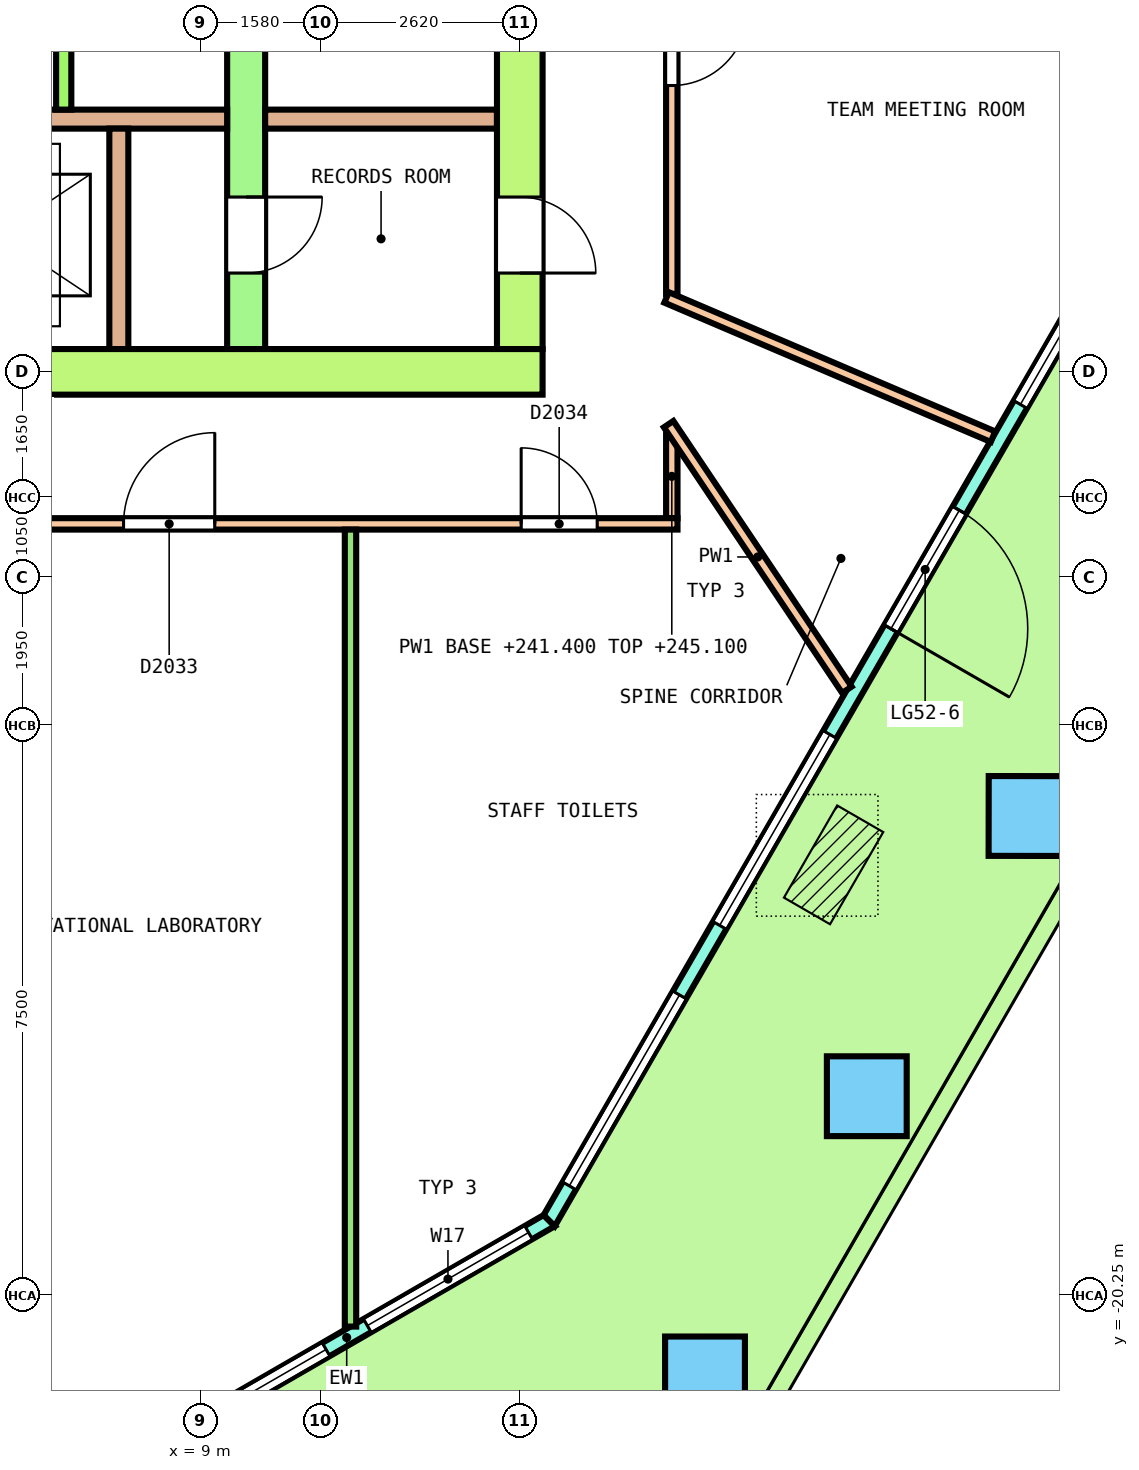
"""IFC4 building model, lengths in metres.
Left out: names, types, materials, properties, quantities, classifications, styles, units other than length and angle.
Written with IfcOpenShell. Run it as: python <this file> out.ifc"""

import sys

from ifc_helpers import new_model, si_unit, direction, frame, frame_2d, origin, origin_2d, place, context, subcontext, project, spatial, polyline, rectangle, outline, extrude, element, fill, save


model = new_model("IFC4")
c1 = context("Model", 3, precision=1e-05, world=origin(), true_north=direction((0.0, 1.0)))
c2 = subcontext(c1, "Body", "Model", "MODEL_VIEW")
j1 = project(units=[si_unit("LENGTHUNIT", "METRE"), si_unit("PLANEANGLEUNIT", "RADIAN")], contexts=[c1])
p1 = place(None, origin())
s1 = spatial("IfcSite", under=j1, at=p1, CompositionType="ELEMENT")
p2 = place(p1, origin())
s2 = spatial("IfcBuilding", under=s1, at=p2, CompositionType="ELEMENT")
p3 = place(p2, frame((0.0, 0.0, 241.4)))
s3 = spatial("IfcBuildingStorey", under=s2, at=p3, CompositionType="ELEMENT", Elevation=241.4)
p4 = place(p3, frame((15.637, -21.316, 0.0), z_axis=(-0.018113955825, -0.03141534774, 0.999342263957), x_axis=(0.499040514287, 0.865819568771, 0.036263472456)))
e1 = element("IfcColumn", 1, at=p4, inside=s3, PredefinedType="COLUMN", context=c2, shape_type="SweptSolid", body=[
    extrude(rectangle(XDim=1.05, YDim=1.05, at=origin_2d()), origin(), (0.0, 0.0, 1.0), 3.653),
])
p5 = place(p3, frame((17.765, -17.63, 0.0), z_axis=(-0.010899694483, -0.018857140148, 0.999762774325), x_axis=(0.500226191374, 0.865620795957, 0.021780612244)))
e2 = element("IfcColumn", 2, at=p5, inside=s3, PredefinedType="COLUMN", context=c2, shape_type="SweptSolid", body=[
    extrude(rectangle(XDim=1.05, YDim=1.05, at=origin_2d()), origin(), (0.0, 0.0, 1.0), 3.651),
])
p6 = place(p3, frame((19.894, -13.943, 0.0), z_axis=(-0.003611702075, -0.006353920318, 0.999973291296), x_axis=(0.495427453778, 0.868618570756, 0.007308664753)))
e3 = element("IfcColumn", 3, at=p6, inside=s3, PredefinedType="COLUMN", context=c2, shape_type="SweptSolid", body=[
    extrude(rectangle(XDim=1.05, YDim=1.05, at=origin_2d()), origin(), (0.0, 0.0, 1.0), 3.65),
])
p7 = place(p3, frame((8.259, -22.343, 0.0), z_axis=(0.0, 0.0, 1.0), x_axis=(0.866029647142, 0.499992650217, 0.0)))
e4 = element("IfcWall", 4, at=p7, inside=s3, PredefinedType="SOLIDWALL", context=c2, shape_type="SweptSolid", body=[
    extrude(outline(polyline([(-0.027, -0.1), (1.008, -0.1), (2.042, -0.1), (3.076, -0.1), (4.111, -0.1), (5.145, -0.1), (6.18, -0.1), (6.126, 0.1), (5.109, 0.1), (4.093, 0.1), (3.076, 0.1), (2.06, 0.1), (1.043, 0.1), (0.027, 0.1), (-0.027, -0.1)])), origin(), (0.0, 0.0, 1.0), 3.7),
])
p8 = place(p7, frame((0.313, 0.0, 0.1)))
e5 = element("IfcOpeningElement", 5, at=p8, cuts=e4, PredefinedType="OPENING", context=c2, shape_type="SweptSolid", body=[
    extrude(rectangle(XDim=2.45, YDim=2.65, at=frame_2d((1.225, 1.325))), frame((0.0, 0.11, 0.0), z_axis=(0.0, -1.0, 0.0), x_axis=(1.0, 0.0, 0.0)), (0.0, 0.0, 1.0), 0.22),
])
p9 = place(p7, frame((3.39, 0.0, 0.1)))
e6 = element("IfcOpeningElement", 6, at=p9, cuts=e4, PredefinedType="OPENING", context=c2, shape_type="SweptSolid", body=[
    extrude(rectangle(XDim=2.45, YDim=2.65, at=frame_2d((1.225, 1.325))), frame((0.0, 0.11, 0.0), z_axis=(0.0, -1.0, 0.0), x_axis=(1.0, 0.0, 0.0)), (0.0, 0.0, 1.0), 0.22),
])
p10 = place(p3, frame((13.587, -19.266, 0.0), z_axis=(0.0, 0.0, 1.0), x_axis=(0.500004117472, 0.866023026548, 0.0)))
e7 = element("IfcWall", 7, at=p10, inside=s3, PredefinedType="SOLIDWALL", context=c2, shape_type="SweptSolid", body=[
    extrude(outline(polyline([(-0.027, -0.1), (1.017, -0.1), (2.061, -0.1), (3.105, -0.1), (4.149, -0.1), (5.193, -0.1), (6.237, -0.1), (7.281, -0.1), (8.325, -0.1), (9.369, -0.1), (10.414, -0.1), (11.458, -0.1), (12.501, -0.1), (13.546, -0.1), (14.59, -0.1), (15.634, -0.1), (16.678, -0.1), (17.722, -0.1), (18.766, -0.1), (19.81, -0.1), (19.756, 0.1), (18.718, 0.1), (17.679, 0.1), (16.641, 0.1), (15.603, 0.1), (14.564, 0.1), (13.526, 0.1), (12.488, 0.1), (11.449, 0.1), (10.411, 0.1), (9.372, 0.1), (8.334, 0.1), (7.295, 0.1), (6.257, 0.1), (5.219, 0.1), (4.18, 0.1), (3.142, 0.1), (2.104, 0.1), (1.065, 0.1), (0.027, 0.1), (-0.027, -0.1)])), origin(), (0.0, 0.0, 1.0), 3.7),
])
p11 = place(p10, frame((0.528, 0.0, 0.1)))
e8 = element("IfcOpeningElement", 8, at=p11, cuts=e7, PredefinedType="OPENING", context=c2, shape_type="SweptSolid", body=[
    extrude(rectangle(XDim=2.9, YDim=2.65, at=frame_2d((1.45, 1.325))), frame((0.0, 0.11, 0.0), z_axis=(0.0, -1.0, 0.0), x_axis=(1.0, 0.0, 0.0)), (0.0, 0.0, 1.0), 0.22),
])
p12 = place(p10, frame((4.485, 0.0, 0.1)))
e9 = element("IfcOpeningElement", 9, at=p12, cuts=e7, PredefinedType="OPENING", context=c2, shape_type="SweptSolid", body=[
    extrude(rectangle(XDim=2.9, YDim=2.65, at=frame_2d((1.45, 1.325))), frame((0.0, 0.11, 0.0), z_axis=(0.0, -1.0, 0.0), x_axis=(1.0, 0.0, 0.0)), (0.0, 0.0, 1.0), 0.22),
])
p13 = place(p10, frame((8.991, 0.0, 0.0)))
e10 = element("IfcOpeningElement", 10, at=p13, cuts=e7, PredefinedType="OPENING", context=c2, shape_type="SweptSolid", body=[
    extrude(rectangle(XDim=1.8, YDim=2.4, at=frame_2d((0.9, 1.2))), frame((0.0, 0.11, 0.0), z_axis=(0.0, -1.0, 0.0), x_axis=(1.0, 0.0, 0.0)), (0.0, 0.0, 1.0), 0.22),
])
p14 = place(p10, frame((8.991, 0.0, 2.55)))
e11 = element("IfcOpeningElement", 11, at=p14, cuts=e7, PredefinedType="OPENING", context=c2, shape_type="SweptSolid", body=[
    extrude(rectangle(XDim=1.8, YDim=0.2, at=frame_2d((0.9, 0.1))), frame((0.0, 0.11, 0.0), z_axis=(0.0, -1.0, 0.0), x_axis=(1.0, 0.0, 0.0)), (0.0, 0.0, 1.0), 0.22),
])
p15 = place(p10, frame((12.398, 0.0, 0.1)))
e12 = element("IfcOpeningElement", 12, at=p15, cuts=e7, PredefinedType="OPENING", context=c2, shape_type="SweptSolid", body=[
    extrude(rectangle(XDim=2.9, YDim=2.65, at=frame_2d((1.45, 1.325))), frame((0.0, 0.11, 0.0), z_axis=(0.0, -1.0, 0.0), x_axis=(1.0, 0.0, 0.0)), (0.0, 0.0, 1.0), 0.22),
])
p16 = place(p10, frame((16.355, 0.0, 0.1)))
e13 = element("IfcOpeningElement", 13, at=p16, cuts=e7, PredefinedType="OPENING", context=c2, shape_type="SweptSolid", body=[
    extrude(rectangle(XDim=2.9, YDim=2.65, at=frame_2d((1.45, 1.325))), frame((0.0, 0.11, 0.0), z_axis=(0.0, -1.0, 0.0), x_axis=(1.0, 0.0, 0.0)), (0.0, 0.0, 1.0), 0.22),
])
p17 = place(p3, frame((-13.5, -8.1, 0.0), z_axis=(0.0, 0.0, 1.0), x_axis=(1.0, 0.0, 0.0)))
e14 = element("IfcWall", 14, at=p17, inside=s3, PredefinedType="SHEAR", context=c2, shape_type="SweptSolid", body=[
    extrude(rectangle(XDim=27.0, YDim=0.6, at=frame_2d((13.5, 0.0))), origin(), (0.0, 0.0, 1.0), 3.7),
])
p18 = place(p17, frame((15.05, 0.0, 0.0)))
e15 = element("IfcOpeningElement", 15, at=p18, cuts=e14, PredefinedType="OPENING", context=c2, shape_type="SweptSolid", body=[
    extrude(rectangle(XDim=1.2, YDim=2.1, at=frame_2d((0.6, 1.05))), frame((0.0, 0.31, 0.0), z_axis=(0.0, -1.0, 0.0), x_axis=(1.0, 0.0, 0.0)), (0.0, 0.0, 1.0), 0.62),
])
p19 = place(p3, frame((13.2, -7.8, 0.0), z_axis=(0.0, 0.0, 1.0), x_axis=(0.0, 1.0, 0.0)))
e16 = element("IfcWall", 16, at=p19, inside=s3, PredefinedType="SHEAR", context=c2, shape_type="SweptSolid", body=[
    extrude(rectangle(XDim=15.6, YDim=0.6, at=frame_2d((7.8, 0.0))), origin(), (0.0, 0.0, 1.0), 3.7),
])
p20 = place(p19, frame((6.6, 0.0, 0.0)))
e17 = element("IfcOpeningElement", 17, at=p20, cuts=e16, PredefinedType="OPENING", context=c2, shape_type="SweptSolid", body=[
    extrude(rectangle(XDim=2.4, YDim=2.1, at=frame_2d((1.2, 1.05))), frame((0.0, 0.31, 0.0), z_axis=(0.0, -1.0, 0.0), x_axis=(1.0, 0.0, 0.0)), (0.0, 0.0, 1.0), 0.62),
])
p21 = place(p19, frame((13.5, 0.0, 0.0)))
e18 = element("IfcOpeningElement", 18, at=p21, cuts=e16, PredefinedType="OPENING", context=c2, shape_type="SweptSolid", body=[
    extrude(rectangle(XDim=1.2, YDim=2.1, at=frame_2d((0.6, 1.05))), frame((0.0, 0.31, 0.0), z_axis=(0.0, -1.0, 0.0), x_axis=(1.0, 0.0, 0.0)), (0.0, 0.0, 1.0), 0.62),
])
p22 = place(p19, frame((1.0, 0.0, 0.0)))
e19 = element("IfcOpeningElement", 19, at=p22, cuts=e16, PredefinedType="OPENING", context=c2, shape_type="SweptSolid", body=[
    extrude(rectangle(XDim=1.0, YDim=2.1, at=frame_2d((0.5, 1.05))), frame((0.0, 0.31, 0.0), z_axis=(0.0, -1.0, 0.0), x_axis=(1.0, 0.0, 0.0)), (0.0, 0.0, 1.0), 0.62),
])
p23 = place(p3, frame((9.6, -7.8, 0.0), z_axis=(0.0, 0.0, 1.0), x_axis=(0.0, 1.0, 0.0)))
e20 = element("IfcWall", 20, at=p23, inside=s3, PredefinedType="SHEAR", context=c2, shape_type="SweptSolid", body=[
    extrude(rectangle(XDim=15.6, YDim=0.5, at=frame_2d((7.8, 0.0))), origin(), (0.0, 0.0, 1.0), 3.7),
])
p24 = place(p23, frame((6.6, 0.0, 0.0)))
e21 = element("IfcOpeningElement", 21, at=p24, cuts=e20, PredefinedType="OPENING", context=c2, shape_type="SweptSolid", body=[
    extrude(rectangle(XDim=2.4, YDim=2.1, at=frame_2d((1.2, 1.05))), frame((0.0, 0.26, 0.0), z_axis=(0.0, -1.0, 0.0), x_axis=(1.0, 0.0, 0.0)), (0.0, 0.0, 1.0), 0.52),
])
p25 = place(p23, frame((13.5, 0.0, 0.0)))
e22 = element("IfcOpeningElement", 22, at=p25, cuts=e20, PredefinedType="OPENING", context=c2, shape_type="SweptSolid", body=[
    extrude(rectangle(XDim=1.2, YDim=2.1, at=frame_2d((0.6, 1.05))), frame((0.0, 0.26, 0.0), z_axis=(0.0, -1.0, 0.0), x_axis=(1.0, 0.0, 0.0)), (0.0, 0.0, 1.0), 0.52),
])
p26 = place(p23, frame((1.0, 0.0, 0.0)))
e23 = element("IfcOpeningElement", 23, at=p26, cuts=e20, PredefinedType="OPENING", context=c2, shape_type="SweptSolid", body=[
    extrude(rectangle(XDim=1.0, YDim=2.1, at=frame_2d((0.5, 1.05))), frame((0.0, 0.26, 0.0), z_axis=(0.0, -1.0, 0.0), x_axis=(1.0, 0.0, 0.0)), (0.0, 0.0, 1.0), 0.52),
])
p27 = place(p3, frame((-9.35, -4.775, 0.0), z_axis=(0.0, 0.0, 1.0), x_axis=(1.0, 0.0, 0.0)))
e24 = element("IfcWall", 24, at=p27, inside=s3, PredefinedType="SOLIDWALL", context=c2, shape_type="SweptSolid", body=[
    extrude(rectangle(XDim=18.7, YDim=0.25, at=frame_2d((9.35, 0.0))), origin(), (0.0, 0.0, 1.0), 3.7),
])
p28 = place(p3, frame((9.85, -4.775, 0.0), z_axis=(0.0, 0.0, 1.0), x_axis=(1.0, 0.0, 0.0)))
e25 = element("IfcWall", 25, at=p28, inside=s3, PredefinedType="SOLIDWALL", context=c2, shape_type="SweptSolid", body=[
    extrude(rectangle(XDim=3.05, YDim=0.25, at=frame_2d((1.525, 0.0))), origin(), (0.0, 0.0, 1.0), 3.7),
])
p29 = place(p3, frame((7.2, -4.65, 0.0), z_axis=(0.0, 0.0, 1.0), x_axis=(0.0, 1.0, 0.0)))
e26 = element("IfcWall", 26, at=p29, inside=s3, PredefinedType="SOLIDWALL", context=c2, shape_type="SweptSolid", body=[
    extrude(rectangle(XDim=2.9, YDim=0.2, at=frame_2d((1.45, 0.0))), origin(), (0.0, 0.0, 1.0), 3.7),
])
p30 = place(p3, frame((7.925, -7.8, 0.0), z_axis=(0.0, 0.0, 1.0), x_axis=(0.0, 1.0, 0.0)))
e27 = element("IfcWall", 27, at=p30, inside=s3, PredefinedType="SOLIDWALL", context=c2, shape_type="SweptSolid", body=[
    extrude(rectangle(XDim=2.9, YDim=0.25, at=frame_2d((1.45, 0.0))), origin(), (0.0, 0.0, 1.0), 3.7),
])
p31 = place(p3, frame((15.2, -10.025, 0.0), z_axis=(0.0, 0.0, 1.0), x_axis=(0.0, 1.0, 0.0)))
e28 = element("IfcWall", 28, at=p31, inside=s3, PredefinedType="PARTITIONING", context=c2, shape_type="SweptSolid", body=[
    extrude(rectangle(XDim=1.1, YDim=0.15, at=frame_2d((0.55, 0.0))), origin(), (0.0, 0.0, 1.0), 3.7),
])
p32 = place(p3, frame((15.2, -7.075, 0.0), z_axis=(0.0, 0.0, 1.0), x_axis=(0.0, 1.0, 0.0)))
e29 = element("IfcWall", 29, at=p32, inside=s3, PredefinedType="PARTITIONING", context=c2, shape_type="SweptSolid", body=[
    extrude(rectangle(XDim=17.1, YDim=0.15, at=frame_2d((8.55, 0.0))), origin(), (0.0, 0.0, 1.0), 2.8),
])
p33 = place(p32, frame((7.418, 0.0, 0.0)))
e30 = element("IfcOpeningElement", 30, at=p33, cuts=e29, PredefinedType="OPENING", context=c2, shape_type="SweptSolid", body=[
    extrude(rectangle(XDim=1.2, YDim=2.1, at=frame_2d((0.6, 1.05))), frame((0.0, 0.085, 0.0), z_axis=(0.0, -1.0, 0.0), x_axis=(1.0, 0.0, 0.0)), (0.0, 0.0, 1.0), 0.17),
])
p34 = place(p32, frame((12.815, 0.0, 0.0)))
e31 = element("IfcOpeningElement", 31, at=p34, cuts=e29, PredefinedType="OPENING", context=c2, shape_type="SweptSolid", body=[
    extrude(rectangle(XDim=1.2, YDim=2.1, at=frame_2d((0.6, 1.05))), frame((0.0, 0.085, 0.0), z_axis=(0.0, -1.0, 0.0), x_axis=(1.0, 0.0, 0.0)), (0.0, 0.0, 1.0), 0.17),
])
p35 = place(p32, frame((2.742, 0.0, 0.0)))
e32 = element("IfcOpeningElement", 32, at=p35, cuts=e29, PredefinedType="OPENING", context=c2, shape_type="SweptSolid", body=[
    extrude(rectangle(XDim=1.0, YDim=2.1, at=frame_2d((0.5, 1.05))), frame((0.0, 0.085, 0.0), z_axis=(0.0, -1.0, 0.0), x_axis=(1.0, 0.0, 0.0)), (0.0, 0.0, 1.0), 0.17),
])
p36 = place(p3, frame((-15.275, -10.1, 0.0), z_axis=(0.0, 0.0, 1.0), x_axis=(1.0, 0.0, 0.0)))
e33 = element("IfcWall", 33, at=p36, inside=s3, PredefinedType="PARTITIONING", context=c2, shape_type="SweptSolid", body=[
    extrude(rectangle(XDim=30.55, YDim=0.15, at=frame_2d((15.275, 0.0))), origin(), (0.0, 0.0, 1.0), 2.8),
])
p37 = place(p36, frame((3.181, 0.0, 0.0)))
e34 = element("IfcOpeningElement", 34, at=p37, cuts=e33, PredefinedType="OPENING", context=c2, shape_type="SweptSolid", body=[
    extrude(rectangle(XDim=1.2, YDim=2.1, at=frame_2d((0.6, 1.05))), frame((0.0, 0.085, 0.0), z_axis=(0.0, -1.0, 0.0), x_axis=(1.0, 0.0, 0.0)), (0.0, 0.0, 1.0), 0.17),
])
p38 = place(p36, frame((8.522, 0.0, 0.0)))
e35 = element("IfcOpeningElement", 35, at=p38, cuts=e33, PredefinedType="OPENING", context=c2, shape_type="SweptSolid", body=[
    extrude(rectangle(XDim=1.2, YDim=2.1, at=frame_2d((0.6, 1.05))), frame((0.0, 0.085, 0.0), z_axis=(0.0, -1.0, 0.0), x_axis=(1.0, 0.0, 0.0)), (0.0, 0.0, 1.0), 0.17),
])
p39 = place(p36, frame((15.2, 0.0, 0.0)))
e36 = element("IfcOpeningElement", 36, at=p39, cuts=e33, PredefinedType="OPENING", context=c2, shape_type="SweptSolid", body=[
    extrude(rectangle(XDim=1.0, YDim=2.1, at=frame_2d((0.5, 1.05))), frame((0.0, 0.085, 0.0), z_axis=(0.0, -1.0, 0.0), x_axis=(1.0, 0.0, 0.0)), (0.0, 0.0, 1.0), 0.17),
])
p40 = place(p36, frame((23.262, 0.0, 0.0)))
e37 = element("IfcOpeningElement", 37, at=p40, cuts=e33, PredefinedType="OPENING", context=c2, shape_type="SweptSolid", body=[
    extrude(rectangle(XDim=1.2, YDim=2.1, at=frame_2d((0.6, 1.05))), frame((0.0, 0.085, 0.0), z_axis=(0.0, -1.0, 0.0), x_axis=(1.0, 0.0, 0.0)), (0.0, 0.0, 1.0), 0.17),
])
p41 = place(p36, frame((28.493, 0.0, 0.0)))
e38 = element("IfcOpeningElement", 38, at=p41, cuts=e33, PredefinedType="OPENING", context=c2, shape_type="SweptSolid", body=[
    extrude(rectangle(XDim=1.0, YDim=2.1, at=frame_2d((0.5, 1.05))), frame((0.0, 0.085, 0.0), z_axis=(0.0, -1.0, 0.0), x_axis=(1.0, 0.0, 0.0)), (0.0, 0.0, 1.0), 0.17),
])
p42 = place(p3, frame((15.158, -8.788, 0.0), z_axis=(0.0, 0.0, 1.0), x_axis=(0.557200585309, -0.830377930662, 0.0)))
e39 = element("IfcWall", 39, at=p42, inside=s3, PredefinedType="PARTITIONING", context=c2, shape_type="SweptSolid", body=[
    extrude(rectangle(XDim=4.209, YDim=0.15, at=frame_2d((2.105, 0.0))), origin(), (0.0, 0.0, 1.0), 2.8),
])
p43 = place(p3, frame((15.131, -7.121, 0.0), z_axis=(0.0, 0.0, 1.0), x_axis=(0.919795529943, -0.39239799069, 0.0)))
e40 = element("IfcWall", 40, at=p43, inside=s3, PredefinedType="PARTITIONING", context=c2, shape_type="SweptSolid", body=[
    extrude(rectangle(XDim=4.669, YDim=0.15, at=frame_2d((2.335, 0.0))), origin(), (0.0, 0.0, 1.0), 2.8),
])
p44 = place(p3, frame((10.973, -20.66, 0.0), z_axis=(0.0, 0.0, 1.0), x_axis=(0.0, 1.0, 0.0)))
e41 = element("IfcWall", 41, at=p44, inside=s3, PredefinedType="PARTITIONING", context=c2, shape_type="SweptSolid", body=[
    extrude(rectangle(XDim=10.485, YDim=0.15, at=frame_2d((5.243, 0.0))), origin(), (0.0, 0.0, 1.0), 2.8),
])
p45 = place(p8, origin())
e42 = element("IfcWindow", 42, at=p45, inside=s3, PartitioningType="SINGLE_PANEL", PredefinedType="WINDOW", context=c2, shape_type="SweptSolid", body=[
    extrude(rectangle(XDim=2.45, YDim=2.65, at=frame_2d((1.225, 1.325))), frame((0.0, 0.03, 0.0), z_axis=(0.0, -1.0, 0.0), x_axis=(1.0, 0.0, 0.0)), (0.0, 0.0, 1.0), 0.06),
])
fill(e5, e42)
p46 = place(p9, origin())
e43 = element("IfcWindow", 43, at=p46, inside=s3, PartitioningType="SINGLE_PANEL", PredefinedType="WINDOW", context=c2, shape_type="SweptSolid", body=[
    extrude(rectangle(XDim=2.45, YDim=2.65, at=frame_2d((1.225, 1.325))), frame((0.0, 0.03, 0.0), z_axis=(0.0, -1.0, 0.0), x_axis=(1.0, 0.0, 0.0)), (0.0, 0.0, 1.0), 0.06),
])
fill(e6, e43)
p47 = place(p11, origin())
e44 = element("IfcWindow", 44, at=p47, inside=s3, PartitioningType="SINGLE_PANEL", PredefinedType="WINDOW", context=c2, shape_type="SweptSolid", body=[
    extrude(rectangle(XDim=2.9, YDim=2.65, at=frame_2d((1.45, 1.325))), frame((0.0, 0.03, 0.0), z_axis=(0.0, -1.0, 0.0), x_axis=(1.0, 0.0, 0.0)), (0.0, 0.0, 1.0), 0.06),
])
fill(e8, e44)
p48 = place(p12, origin())
e45 = element("IfcWindow", 45, at=p48, inside=s3, PartitioningType="SINGLE_PANEL", PredefinedType="WINDOW", context=c2, shape_type="SweptSolid", body=[
    extrude(rectangle(XDim=2.9, YDim=2.65, at=frame_2d((1.45, 1.325))), frame((0.0, 0.03, 0.0), z_axis=(0.0, -1.0, 0.0), x_axis=(1.0, 0.0, 0.0)), (0.0, 0.0, 1.0), 0.06),
])
fill(e9, e45)
p49 = place(p13, origin())
e46 = element("IfcDoor", 46, at=p49, inside=s3, OperationType="DOUBLE_DOOR_SINGLE_SWING", PredefinedType="DOOR", context=c2, shape_type="SweptSolid", body=[
    extrude(rectangle(XDim=1.8, YDim=2.4, at=frame_2d((0.9, 1.2))), frame((0.0, 0.025, 0.0), z_axis=(0.0, -1.0, 0.0), x_axis=(1.0, 0.0, 0.0)), (0.0, 0.0, 1.0), 0.05),
])
fill(e10, e46)
p50 = place(p14, origin())
e47 = element("IfcWindow", 47, at=p50, inside=s3, PartitioningType="SINGLE_PANEL", PredefinedType="WINDOW", context=c2, shape_type="SweptSolid", body=[
    extrude(rectangle(XDim=1.8, YDim=0.2, at=frame_2d((0.9, 0.1))), frame((0.0, 0.03, 0.0), z_axis=(0.0, -1.0, 0.0), x_axis=(1.0, 0.0, 0.0)), (0.0, 0.0, 1.0), 0.06),
])
fill(e11, e47)
p51 = place(p15, origin())
e48 = element("IfcWindow", 48, at=p51, inside=s3, PartitioningType="SINGLE_PANEL", PredefinedType="WINDOW", context=c2, shape_type="SweptSolid", body=[
    extrude(rectangle(XDim=2.9, YDim=2.65, at=frame_2d((1.45, 1.325))), frame((0.0, 0.03, 0.0), z_axis=(0.0, -1.0, 0.0), x_axis=(1.0, 0.0, 0.0)), (0.0, 0.0, 1.0), 0.06),
])
fill(e12, e48)
p52 = place(p26, origin())
e49 = element("IfcDoor", 49, at=p52, inside=s3, OperationType="SINGLE_SWING_RIGHT", PredefinedType="DOOR", context=c2, shape_type="SweptSolid", body=[
    extrude(rectangle(XDim=1.0, YDim=2.1, at=frame_2d((0.5, 1.05))), frame((0.0, 0.2, 0.0), z_axis=(0.0, -1.0, 0.0), x_axis=(1.0, 0.0, 0.0)), (0.0, 0.0, 1.0), 0.4),
])
fill(e23, e49)
p53 = place(p22, origin())
e50 = element("IfcDoor", 50, at=p53, inside=s3, OperationType="SINGLE_SWING_LEFT", PredefinedType="DOOR", context=c2, shape_type="SweptSolid", body=[
    extrude(rectangle(XDim=1.0, YDim=2.1, at=frame_2d((0.5, 1.05))), frame((0.0, 0.25, 0.0), z_axis=(0.0, -1.0, 0.0), x_axis=(1.0, 0.0, 0.0)), (0.0, 0.0, 1.0), 0.5),
])
fill(e19, e50)
p54 = place(p40, origin())
e51 = element("IfcDoor", 51, at=p54, inside=s3, OperationType="DOUBLE_DOOR_SINGLE_SWING", PredefinedType="DOOR", context=c2, shape_type="SweptSolid", body=[
    extrude(rectangle(XDim=1.2, YDim=2.1, at=frame_2d((0.6, 1.05))), frame((0.0, 0.025, 0.0), z_axis=(0.0, -1.0, 0.0), x_axis=(1.0, 0.0, 0.0)), (0.0, 0.0, 1.0), 0.05),
])
fill(e37, e51)
p55 = place(p41, origin())
e52 = element("IfcDoor", 52, at=p55, inside=s3, OperationType="SINGLE_SWING_LEFT", PredefinedType="DOOR", context=c2, shape_type="SweptSolid", body=[
    extrude(rectangle(XDim=1.0, YDim=2.1, at=frame_2d((0.5, 1.05))), frame((0.0, 0.025, 0.0), z_axis=(0.0, -1.0, 0.0), x_axis=(1.0, 0.0, 0.0)), (0.0, 0.0, 1.0), 0.05),
])
fill(e38, e52)
p56 = place(p35, origin())
e53 = element("IfcDoor", 53, at=p56, inside=s3, OperationType="SINGLE_SWING_RIGHT", PredefinedType="DOOR", context=c2, shape_type="SweptSolid", body=[
    extrude(rectangle(XDim=1.0, YDim=2.1, at=frame_2d((0.5, 1.05))), frame((0.0, 0.025, 0.0), z_axis=(0.0, -1.0, 0.0), x_axis=(1.0, 0.0, 0.0)), (0.0, 0.0, 1.0), 0.05),
])
fill(e32, e53)
save(model, sys.argv[1])
